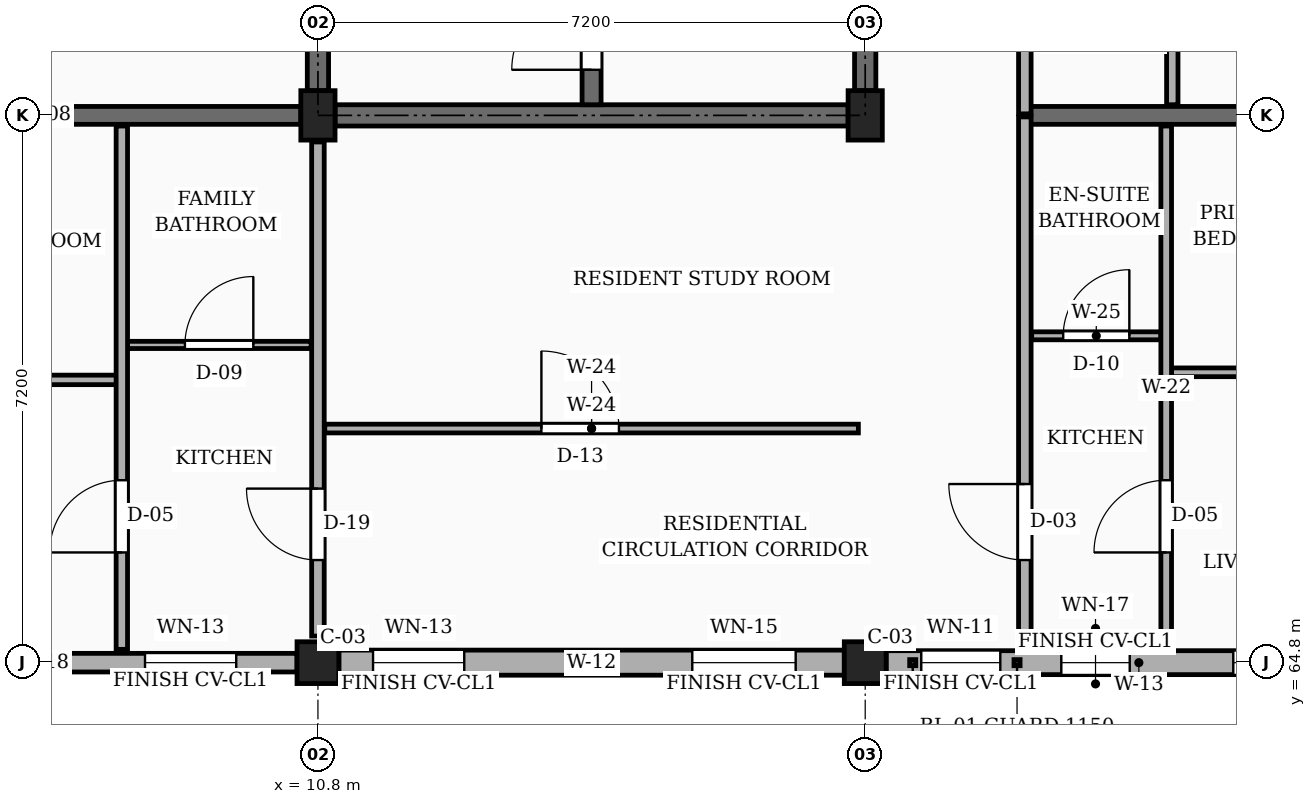
"""IFC4 building model, lengths in metres.
Left out: names, types, materials, properties, quantities, classifications, styles, units other than length and angle.
Written with IfcOpenShell. Run it as: python <this file> out.ifc"""

import sys

from ifc_helpers import new_model, si_unit, direction, frame, frame_2d, origin, origin_2d, place, context, subcontext, project, spatial, rectangle, extrude, element, fill, save


model = new_model("IFC4")
c1 = context("Model", 3, precision=1e-05, world=origin(), true_north=direction((0.0, 1.0)))
c2 = subcontext(c1, "Body", "Model", "MODEL_VIEW")
j1 = project(units=[si_unit("LENGTHUNIT", "METRE"), si_unit("PLANEANGLEUNIT", "RADIAN")], contexts=[c1])
p1 = place(None, origin())
s1 = spatial("IfcSite", under=j1, at=p1, CompositionType="ELEMENT")
p2 = place(p1, origin())
s2 = spatial("IfcBuilding", under=s1, at=p2, CompositionType="ELEMENT")
p3 = place(p2, frame((0.0, 0.0, 20.25)))
s3 = spatial("IfcBuildingStorey", under=s2, at=p3, CompositionType="ELEMENT", Elevation=20.25)
p4 = place(p3, frame((10.8, 64.8, 0.0), z_axis=(0.0, 0.0, 1.0), x_axis=(1.0, 0.0, 0.0)))
e1 = element("IfcColumn", 1, at=p4, inside=s3, PredefinedType="COLUMN", context=c2, shape_type="SweptSolid", body=[
    extrude(rectangle(XDim=0.55, YDim=0.55, at=origin_2d()), origin(), (0.0, 0.0, 1.0), 3.15),
])
p5 = place(p3, frame((10.8, 72.0, 0.0), z_axis=(0.0, 0.0, 1.0), x_axis=(1.0, 0.0, 0.0)))
e2 = element("IfcColumn", 2, at=p5, inside=s3, PredefinedType="COLUMN", context=c2, shape_type="SweptSolid", body=[
    extrude(rectangle(XDim=0.45, YDim=0.65, at=origin_2d()), origin(), (0.0, 0.0, 1.0), 3.15),
])
p6 = place(p3, frame((18.0, 64.8, 0.0), z_axis=(0.0, 0.0, 1.0), x_axis=(1.0, 0.0, 0.0)))
e3 = element("IfcColumn", 3, at=p6, inside=s3, PredefinedType="COLUMN", context=c2, shape_type="SweptSolid", body=[
    extrude(rectangle(XDim=0.55, YDim=0.55, at=origin_2d()), origin(), (0.0, 0.0, 1.0), 3.15),
])
p7 = place(p3, frame((18.0, 72.0, 0.0), z_axis=(0.0, 0.0, 1.0), x_axis=(1.0, 0.0, 0.0)))
e4 = element("IfcColumn", 4, at=p7, inside=s3, PredefinedType="COLUMN", context=c2, shape_type="SweptSolid", body=[
    extrude(rectangle(XDim=0.45, YDim=0.65, at=origin_2d()), origin(), (0.0, 0.0, 1.0), 3.15),
])
p8 = place(p3, frame((3.875, 72.0, 0.0), z_axis=(0.0, 0.0, 1.0), x_axis=(1.0, 0.0, 0.0)))
e5 = element("IfcWall", 5, at=p8, inside=s3, PredefinedType="SOLIDWALL", context=c2, shape_type="SweptSolid", body=[
    extrude(rectangle(XDim=6.7, YDim=0.235, at=frame_2d((3.35, 0.0))), origin(), (0.0, 0.0, 1.0), 2.21),
])
p9 = place(p8, frame((1.35, 0.0, 0.0)))
e6 = element("IfcOpeningElement", 6, at=p9, cuts=e5, PredefinedType="OPENING", context=c2, shape_type="SweptSolid", body=[
    extrude(rectangle(XDim=0.98, YDim=2.12, at=frame_2d((0.49, 1.06))), frame((0.0, 0.127, 0.0), z_axis=(0.0, -1.0, 0.0), x_axis=(1.0, 0.0, 0.0)), (0.0, 0.0, 1.0), 0.255),
])
p10 = place(p3, frame((20.1, 72.0, 0.0), z_axis=(0.0, 0.0, 1.0), x_axis=(1.0, 0.0, 0.0)))
e7 = element("IfcWall", 7, at=p10, inside=s3, PredefinedType="SOLIDWALL", context=c2, shape_type="SweptSolid", body=[
    extrude(rectangle(XDim=4.825, YDim=0.235, at=frame_2d((2.413, 0.0))), origin(), (0.0, 0.0, 1.0), 2.21),
])
p11 = place(p3, frame((3.875, 64.8, 0.0), z_axis=(0.0, 0.0, 1.0), x_axis=(1.0, 0.0, 0.0)))
e8 = element("IfcWall", 8, at=p11, inside=s3, PredefinedType="SOLIDWALL", context=c2, shape_type="SweptSolid", body=[
    extrude(rectangle(XDim=6.65, YDim=0.245, at=frame_2d((3.325, 0.0))), origin(), (0.0, 0.0, 1.0), 2.48),
])
p12 = place(p11, frame((0.45, 0.0, 0.78)))
e9 = element("IfcOpeningElement", 9, at=p12, cuts=e8, PredefinedType="OPENING", context=c2, shape_type="SweptSolid", body=[
    extrude(rectangle(XDim=1.04, YDim=1.26, at=frame_2d((0.52, 0.63))), frame((0.0, 0.133, 0.0), z_axis=(0.0, -1.0, 0.0), x_axis=(1.0, 0.0, 0.0)), (0.0, 0.0, 1.0), 0.265),
])
p13 = place(p11, frame((4.65, 0.0, 0.78)))
e10 = element("IfcOpeningElement", 10, at=p13, cuts=e8, PredefinedType="OPENING", context=c2, shape_type="SweptSolid", body=[
    extrude(rectangle(XDim=1.2, YDim=1.26, at=frame_2d((0.6, 0.63))), frame((0.0, 0.133, 0.0), z_axis=(0.0, -1.0, 0.0), x_axis=(1.0, 0.0, 0.0)), (0.0, 0.0, 1.0), 0.265),
])
p14 = place(p3, frame((11.075, 64.8, 0.0), z_axis=(0.0, 0.0, 1.0), x_axis=(1.0, 0.0, 0.0)))
e11 = element("IfcWall", 11, at=p14, inside=s3, PredefinedType="SOLIDWALL", context=c2, shape_type="SweptSolid", body=[
    extrude(rectangle(XDim=6.65, YDim=0.33, at=frame_2d((3.325, 0.0))), origin(), (0.0, 0.0, 1.0), 2.48),
])
p15 = place(p14, frame((0.45, 0.0, 0.78)))
e12 = element("IfcOpeningElement", 12, at=p15, cuts=e11, PredefinedType="OPENING", context=c2, shape_type="SweptSolid", body=[
    extrude(rectangle(XDim=1.2, YDim=1.26, at=frame_2d((0.6, 0.63))), frame((0.0, 0.175, 0.0), z_axis=(0.0, -1.0, 0.0), x_axis=(1.0, 0.0, 0.0)), (0.0, 0.0, 1.0), 0.35),
])
p16 = place(p14, frame((4.65, 0.0, 0.78)))
e13 = element("IfcOpeningElement", 13, at=p16, cuts=e11, PredefinedType="OPENING", context=c2, shape_type="SweptSolid", body=[
    extrude(rectangle(XDim=1.36, YDim=1.26, at=frame_2d((0.68, 0.63))), frame((0.0, 0.175, 0.0), z_axis=(0.0, -1.0, 0.0), x_axis=(1.0, 0.0, 0.0)), (0.0, 0.0, 1.0), 0.35),
])
p17 = place(p3, frame((18.275, 64.8, 0.0), z_axis=(0.0, 0.0, 1.0), x_axis=(1.0, 0.0, 0.0)))
e14 = element("IfcWall", 14, at=p17, inside=s3, PredefinedType="SOLIDWALL", context=c2, shape_type="SweptSolid", body=[
    extrude(rectangle(XDim=6.65, YDim=0.315, at=frame_2d((3.325, 0.0))), origin(), (0.0, 0.0, 1.0), 2.48),
])
p18 = place(p17, frame((0.462, 0.0, 0.78)))
e15 = element("IfcOpeningElement", 15, at=p18, cuts=e14, PredefinedType="OPENING", context=c2, shape_type="SweptSolid", body=[
    extrude(rectangle(XDim=1.04, YDim=1.26, at=frame_2d((0.52, 0.63))), frame((0.0, 0.167, 0.0), z_axis=(0.0, -1.0, 0.0), x_axis=(1.0, 0.0, 0.0)), (0.0, 0.0, 1.0), 0.335),
])
p19 = place(p17, frame((2.305, 0.0, 0.78)))
e16 = element("IfcOpeningElement", 16, at=p19, cuts=e14, PredefinedType="OPENING", context=c2, shape_type="SweptSolid", body=[
    extrude(rectangle(XDim=0.9, YDim=1.36, at=frame_2d((0.45, 0.68))), frame((0.0, 0.167, 0.0), z_axis=(0.0, -1.0, 0.0), x_axis=(1.0, 0.0, 0.0)), (0.0, 0.0, 1.0), 0.335),
])
p20 = place(p17, frame((4.567, 0.0, 0.78)))
e17 = element("IfcOpeningElement", 17, at=p20, cuts=e14, PredefinedType="OPENING", context=c2, shape_type="SweptSolid", body=[
    extrude(rectangle(XDim=1.06, YDim=1.36, at=frame_2d((0.53, 0.68))), frame((0.0, 0.167, 0.0), z_axis=(0.0, -1.0, 0.0), x_axis=(1.0, 0.0, 0.0)), (0.0, 0.0, 1.0), 0.335),
])
p21 = place(p3, frame((10.8, 72.325, 0.0), z_axis=(0.0, 0.0, 1.0), x_axis=(0.0, 1.0, 0.0)))
e18 = element("IfcWall", 18, at=p21, inside=s3, PredefinedType="SHEAR", context=c2, shape_type="SweptSolid", body=[
    extrude(rectangle(XDim=6.55, YDim=0.28, at=frame_2d((3.275, 0.0))), origin(), (0.0, 0.0, 1.0), 2.91),
])
p22 = place(p3, frame((18.0, 72.325, 0.0), z_axis=(0.0, 0.0, 1.0), x_axis=(0.0, 1.0, 0.0)))
e19 = element("IfcWall", 19, at=p22, inside=s3, PredefinedType="SHEAR", context=c2, shape_type="SweptSolid", body=[
    extrude(rectangle(XDim=6.55, YDim=0.28, at=frame_2d((3.275, 0.0))), origin(), (0.0, 0.0, 1.0), 2.91),
])
p23 = place(p22, frame((1.5, 0.0, 0.0)))
e20 = element("IfcOpeningElement", 20, at=p23, cuts=e19, PredefinedType="OPENING", context=c2, shape_type="SweptSolid", body=[
    extrude(rectangle(XDim=1.1, YDim=2.15, at=frame_2d((0.55, 1.075))), frame((0.0, 0.15, 0.0), z_axis=(0.0, -1.0, 0.0), x_axis=(1.0, 0.0, 0.0)), (0.0, 0.0, 1.0), 0.3),
])
p24 = place(p3, frame((11.025, 72.0, 0.0), z_axis=(0.0, 0.0, 1.0), x_axis=(1.0, 0.0, 0.0)))
e21 = element("IfcWall", 21, at=p24, inside=s3, PredefinedType="SHEAR", context=c2, shape_type="SweptSolid", body=[
    extrude(rectangle(XDim=6.75, YDim=0.28, at=frame_2d((3.375, 0.0))), origin(), (0.0, 0.0, 1.0), 2.91),
])
p25 = place(p3, frame((14.4, 72.14, 0.0), z_axis=(0.0, 0.0, 1.0), x_axis=(0.0, 1.0, 0.0)))
e22 = element("IfcWall", 22, at=p25, inside=s3, PredefinedType="SHEAR", context=c2, shape_type="SweptSolid", body=[
    extrude(rectangle(XDim=6.92, YDim=0.25, at=frame_2d((3.46, 0.0))), origin(), (0.0, 0.0, 1.0), 2.91),
])
p26 = place(p25, frame((0.46, 0.0, 0.0)))
e23 = element("IfcOpeningElement", 23, at=p26, cuts=e22, PredefinedType="OPENING", context=c2, shape_type="SweptSolid", body=[
    extrude(rectangle(XDim=1.05, YDim=2.15, at=frame_2d((0.525, 1.075))), frame((0.0, 0.135, 0.0), z_axis=(0.0, -1.0, 0.0), x_axis=(1.0, 0.0, 0.0)), (0.0, 0.0, 1.0), 0.27),
])
p27 = place(p3, frame((20.1, 64.975, 0.0), z_axis=(0.0, 0.0, 1.0), x_axis=(0.0, 1.0, 0.0)))
e24 = element("IfcWall", 24, at=p27, inside=s3, PredefinedType="PARTITIONING", context=c2, shape_type="SweptSolid", body=[
    extrude(rectangle(XDim=7.005, YDim=0.165, at=frame_2d((3.502, 0.0))), origin(), (0.0, 0.0, 1.0), 2.345),
])
p28 = place(p27, frame((1.175, 0.0, 0.0)))
e25 = element("IfcOpeningElement", 25, at=p28, cuts=e24, PredefinedType="OPENING", context=c2, shape_type="SweptSolid", body=[
    extrude(rectangle(XDim=1.0, YDim=2.15, at=frame_2d((0.5, 1.075))), frame((0.0, 0.093, 0.0), z_axis=(0.0, -1.0, 0.0), x_axis=(1.0, 0.0, 0.0)), (0.0, 0.0, 1.0), 0.185),
])
p29 = place(p3, frame((20.1, 72.02, 0.0), z_axis=(0.0, 0.0, 1.0), x_axis=(0.0, 1.0, 0.0)))
e26 = element("IfcWall", 26, at=p29, inside=s3, PredefinedType="PARTITIONING", context=c2, shape_type="SweptSolid", body=[
    extrude(rectangle(XDim=7.16, YDim=0.165, at=frame_2d((3.58, 0.0))), origin(), (0.0, 0.0, 1.0), 2.345),
])
p30 = place(p29, frame((4.78, 0.0, 0.0)))
e27 = element("IfcOpeningElement", 27, at=p30, cuts=e26, PredefinedType="OPENING", context=c2, shape_type="SweptSolid", body=[
    extrude(rectangle(XDim=0.94, YDim=2.12, at=frame_2d((0.47, 1.06))), frame((0.0, 0.093, 0.0), z_axis=(0.0, -1.0, 0.0), x_axis=(1.0, 0.0, 0.0)), (0.0, 0.0, 1.0), 0.185),
])
p31 = place(p3, frame((10.8, 65.15, 0.0), z_axis=(0.0, 0.0, 1.0), x_axis=(0.0, 1.0, 0.0)))
e28 = element("IfcWall", 28, at=p31, inside=s3, PredefinedType="PARTITIONING", context=c2, shape_type="SweptSolid", body=[
    extrude(rectangle(XDim=6.5, YDim=0.165, at=frame_2d((3.25, 0.0))), origin(), (0.0, 0.0, 1.0), 2.345),
])
p32 = place(p31, frame((1.0, 0.0, 0.0)))
e29 = element("IfcOpeningElement", 29, at=p32, cuts=e28, PredefinedType="OPENING", context=c2, shape_type="SweptSolid", body=[
    extrude(rectangle(XDim=0.94, YDim=2.12, at=frame_2d((0.47, 1.06))), frame((0.0, 0.093, 0.0), z_axis=(0.0, -1.0, 0.0), x_axis=(1.0, 0.0, 0.0)), (0.0, 0.0, 1.0), 0.185),
])
p33 = place(p3, frame((10.89, 67.88, 0.0), z_axis=(0.0, 0.0, 1.0), x_axis=(1.0, 0.0, 0.0)))
e30 = element("IfcWall", 30, at=p33, inside=s3, PredefinedType="PARTITIONING", context=c2, shape_type="SweptSolid", body=[
    extrude(rectangle(XDim=7.02, YDim=0.115, at=frame_2d((3.51, 0.0))), origin(), (0.0, 0.0, 1.0), 2.345),
])
p34 = place(p33, frame((2.85, 0.0, 0.0)))
e31 = element("IfcOpeningElement", 31, at=p34, cuts=e30, PredefinedType="OPENING", context=c2, shape_type="SweptSolid", body=[
    extrude(rectangle(XDim=1.02, YDim=2.15, at=frame_2d((0.51, 1.075))), frame((0.0, 0.067, 0.0), z_axis=(0.0, -1.0, 0.0), x_axis=(1.0, 0.0, 0.0)), (0.0, 0.0, 1.0), 0.135),
])
p35 = place(p3, frame((3.775, 68.52, 0.0), z_axis=(0.0, 0.0, 1.0), x_axis=(1.0, 0.0, 0.0)))
e32 = element("IfcWall", 32, at=p35, inside=s3, PredefinedType="PARTITIONING", context=c2, shape_type="SweptSolid", body=[
    extrude(rectangle(XDim=4.375, YDim=0.125, at=frame_2d((2.188, 0.0))), origin(), (0.0, 0.0, 1.0), 2.345),
])
p36 = place(p35, frame((1.738, 0.0, 0.0)))
e33 = element("IfcOpeningElement", 33, at=p36, cuts=e32, PredefinedType="OPENING", context=c2, shape_type="SweptSolid", body=[
    extrude(rectangle(XDim=0.9, YDim=2.1, at=frame_2d((0.45, 1.05))), frame((0.0, 0.073, 0.0), z_axis=(0.0, -1.0, 0.0), x_axis=(1.0, 0.0, 0.0)), (0.0, 0.0, 1.0), 0.145),
])
p37 = place(p3, frame((8.29, 68.98, 0.0), z_axis=(0.0, 0.0, 1.0), x_axis=(1.0, 0.0, 0.0)))
e34 = element("IfcWall", 34, at=p37, inside=s3, PredefinedType="PARTITIONING", context=c2, shape_type="SweptSolid", body=[
    extrude(rectangle(XDim=2.42, YDim=0.095, at=frame_2d((1.21, 0.0))), origin(), (0.0, 0.0, 1.0), 2.345),
])
p38 = place(p37, frame((0.76, 0.0, 0.0)))
e35 = element("IfcOpeningElement", 35, at=p38, cuts=e34, PredefinedType="OPENING", context=c2, shape_type="SweptSolid", body=[
    extrude(rectangle(XDim=0.9, YDim=2.05, at=frame_2d((0.45, 1.025))), frame((0.0, 0.058, 0.0), z_axis=(0.0, -1.0, 0.0), x_axis=(1.0, 0.0, 0.0)), (0.0, 0.0, 1.0), 0.115),
])
p39 = place(p3, frame((8.22, 64.975, 0.0), z_axis=(0.0, 0.0, 1.0), x_axis=(0.0, 1.0, 0.0)))
e36 = element("IfcWall", 36, at=p39, inside=s3, PredefinedType="PARTITIONING", context=c2, shape_type="SweptSolid", body=[
    extrude(rectangle(XDim=6.885, YDim=0.15, at=frame_2d((3.442, 0.0))), origin(), (0.0, 0.0, 1.0), 2.345),
])
p40 = place(p39, frame((1.275, 0.0, 0.0)))
e37 = element("IfcOpeningElement", 37, at=p40, cuts=e36, PredefinedType="OPENING", context=c2, shape_type="SweptSolid", body=[
    extrude(rectangle(XDim=0.95, YDim=2.1, at=frame_2d((0.475, 1.05))), frame((0.0, 0.085, 0.0), z_axis=(0.0, -1.0, 0.0), x_axis=(1.0, 0.0, 0.0)), (0.0, 0.0, 1.0), 0.17),
])
p41 = place(p3, frame((22.03, 68.62, 0.0), z_axis=(0.0, 0.0, 1.0), x_axis=(1.0, 0.0, 0.0)))
e38 = element("IfcWall", 38, at=p41, inside=s3, PredefinedType="PARTITIONING", context=c2, shape_type="SweptSolid", body=[
    extrude(rectangle(XDim=2.995, YDim=0.115, at=frame_2d((1.498, 0.0))), origin(), (0.0, 0.0, 1.0), 2.345),
])
p42 = place(p41, frame((1.048, 0.0, 0.0)))
e39 = element("IfcOpeningElement", 39, at=p42, cuts=e38, PredefinedType="OPENING", context=c2, shape_type="SweptSolid", body=[
    extrude(rectangle(XDim=0.9, YDim=2.1, at=frame_2d((0.45, 1.05))), frame((0.0, 0.067, 0.0), z_axis=(0.0, -1.0, 0.0), x_axis=(1.0, 0.0, 0.0)), (0.0, 0.0, 1.0), 0.135),
])
p43 = place(p3, frame((20.19, 69.1, 0.0), z_axis=(0.0, 0.0, 1.0), x_axis=(1.0, 0.0, 0.0)))
e40 = element("IfcWall", 40, at=p43, inside=s3, PredefinedType="PARTITIONING", context=c2, shape_type="SweptSolid", body=[
    extrude(rectangle(XDim=1.7, YDim=0.105, at=frame_2d((0.85, 0.0))), origin(), (0.0, 0.0, 1.0), 2.345),
])
p44 = place(p43, frame((0.415, 0.0, 0.0)))
e41 = element("IfcOpeningElement", 41, at=p44, cuts=e40, PredefinedType="OPENING", context=c2, shape_type="SweptSolid", body=[
    extrude(rectangle(XDim=0.87, YDim=2.05, at=frame_2d((0.435, 1.025))), frame((0.0, 0.062, 0.0), z_axis=(0.0, -1.0, 0.0), x_axis=(1.0, 0.0, 0.0)), (0.0, 0.0, 1.0), 0.125),
])
p45 = place(p3, frame((21.96, 64.975, 0.0), z_axis=(0.0, 0.0, 1.0), x_axis=(0.0, 1.0, 0.0)))
e42 = element("IfcWall", 42, at=p45, inside=s3, PredefinedType="PARTITIONING", context=c2, shape_type="SweptSolid", body=[
    extrude(rectangle(XDim=6.885, YDim=0.14, at=frame_2d((3.442, 0.0))), origin(), (0.0, 0.0, 1.0), 2.345),
])
p46 = place(p45, frame((1.275, 0.0, 0.0)))
e43 = element("IfcOpeningElement", 43, at=p46, cuts=e42, PredefinedType="OPENING", context=c2, shape_type="SweptSolid", body=[
    extrude(rectangle(XDim=0.95, YDim=2.1, at=frame_2d((0.475, 1.05))), frame((0.0, 0.08, 0.0), z_axis=(0.0, -1.0, 0.0), x_axis=(1.0, 0.0, 0.0)), (0.0, 0.0, 1.0), 0.16),
])
p47 = place(p3, frame((22.04, 72.14, 0.0), z_axis=(0.0, 0.0, 1.0), x_axis=(0.0, 1.0, 0.0)))
e44 = element("IfcWall", 44, at=p47, inside=s3, PredefinedType="PARTITIONING", context=c2, shape_type="SweptSolid", body=[
    extrude(rectangle(XDim=6.92, YDim=0.15, at=frame_2d((3.46, 0.0))), origin(), (0.0, 0.0, 1.0), 2.345),
])
p48 = place(p47, frame((4.66, 0.0, 0.0)))
e45 = element("IfcOpeningElement", 45, at=p48, cuts=e44, PredefinedType="OPENING", context=c2, shape_type="SweptSolid", body=[
    extrude(rectangle(XDim=0.92, YDim=2.1, at=frame_2d((0.46, 1.05))), frame((0.0, 0.085, 0.0), z_axis=(0.0, -1.0, 0.0), x_axis=(1.0, 0.0, 0.0)), (0.0, 0.0, 1.0), 0.17),
])
p49 = place(p13, origin())
e46 = element("IfcWindow", 46, at=p49, inside=s3, PartitioningType="SINGLE_PANEL", PredefinedType="WINDOW", context=c2, shape_type="SweptSolid", body=[
    extrude(rectangle(XDim=1.2, YDim=1.26, at=frame_2d((0.6, 0.63))), frame((0.0, 0.03, 0.0), z_axis=(0.0, -1.0, 0.0), x_axis=(1.0, 0.0, 0.0)), (0.0, 0.0, 1.0), 0.06),
])
fill(e10, e46)
p50 = place(p15, origin())
e47 = element("IfcWindow", 47, at=p50, inside=s3, PartitioningType="SINGLE_PANEL", PredefinedType="WINDOW", context=c2, shape_type="SweptSolid", body=[
    extrude(rectangle(XDim=1.2, YDim=1.26, at=frame_2d((0.6, 0.63))), frame((0.0, 0.03, 0.0), z_axis=(0.0, -1.0, 0.0), x_axis=(1.0, 0.0, 0.0)), (0.0, 0.0, 1.0), 0.06),
])
fill(e12, e47)
p51 = place(p16, origin())
e48 = element("IfcWindow", 48, at=p51, inside=s3, PartitioningType="SINGLE_PANEL", PredefinedType="WINDOW", context=c2, shape_type="SweptSolid", body=[
    extrude(rectangle(XDim=1.36, YDim=1.26, at=frame_2d((0.68, 0.63))), frame((0.0, 0.03, 0.0), z_axis=(0.0, -1.0, 0.0), x_axis=(1.0, 0.0, 0.0)), (0.0, 0.0, 1.0), 0.06),
])
fill(e13, e48)
p52 = place(p18, origin())
e49 = element("IfcWindow", 49, at=p52, inside=s3, PartitioningType="SINGLE_PANEL", PredefinedType="WINDOW", context=c2, shape_type="SweptSolid", body=[
    extrude(rectangle(XDim=1.04, YDim=1.26, at=frame_2d((0.52, 0.63))), frame((0.0, 0.03, 0.0), z_axis=(0.0, -1.0, 0.0), x_axis=(1.0, 0.0, 0.0)), (0.0, 0.0, 1.0), 0.06),
])
fill(e15, e49)
p53 = place(p19, origin())
e50 = element("IfcWindow", 50, at=p53, inside=s3, PartitioningType="SINGLE_PANEL", PredefinedType="WINDOW", context=c2, shape_type="SweptSolid", body=[
    extrude(rectangle(XDim=0.9, YDim=1.36, at=frame_2d((0.45, 0.68))), frame((0.0, 0.03, 0.0), z_axis=(0.0, -1.0, 0.0), x_axis=(1.0, 0.0, 0.0)), (0.0, 0.0, 1.0), 0.06),
])
fill(e16, e50)
p54 = place(p20, origin())
e51 = element("IfcWindow", 51, at=p54, inside=s3, PartitioningType="SINGLE_PANEL", PredefinedType="WINDOW", context=c2, shape_type="SweptSolid", body=[
    extrude(rectangle(XDim=1.06, YDim=1.36, at=frame_2d((0.53, 0.68))), frame((0.0, 0.03, 0.0), z_axis=(0.0, -1.0, 0.0), x_axis=(1.0, 0.0, 0.0)), (0.0, 0.0, 1.0), 0.06),
])
fill(e17, e51)
p55 = place(p26, origin())
e52 = element("IfcDoor", 52, at=p55, inside=s3, OperationType="SINGLE_SWING_LEFT", PredefinedType="DOOR", context=c2, shape_type="SweptSolid", body=[
    extrude(rectangle(XDim=1.05, YDim=2.15, at=frame_2d((0.525, 1.075))), frame((0.0, 0.025, 0.0), z_axis=(0.0, -1.0, 0.0), x_axis=(1.0, 0.0, 0.0)), (0.0, 0.0, 1.0), 0.05),
])
fill(e23, e52)
p56 = place(p28, origin())
e53 = element("IfcDoor", 53, at=p56, inside=s3, OperationType="SINGLE_SWING_RIGHT", PredefinedType="DOOR", context=c2, shape_type="SweptSolid", body=[
    extrude(rectangle(XDim=1.0, YDim=2.15, at=frame_2d((0.5, 1.075))), frame((0.0, 0.025, 0.0), z_axis=(0.0, -1.0, 0.0), x_axis=(1.0, 0.0, 0.0)), (0.0, 0.0, 1.0), 0.05),
])
fill(e25, e53)
p57 = place(p32, origin())
e54 = element("IfcDoor", 54, at=p57, inside=s3, OperationType="SINGLE_SWING_RIGHT", PredefinedType="DOOR", context=c2, shape_type="SweptSolid", body=[
    extrude(rectangle(XDim=0.94, YDim=2.12, at=frame_2d((0.47, 1.06))), frame((0.0, 0.025, 0.0), z_axis=(0.0, -1.0, 0.0), x_axis=(1.0, 0.0, 0.0)), (0.0, 0.0, 1.0), 0.05),
])
fill(e29, e54)
p58 = place(p34, origin())
e55 = element("IfcDoor", 55, at=p58, inside=s3, OperationType="SINGLE_SWING_LEFT", PredefinedType="DOOR", context=c2, shape_type="SweptSolid", body=[
    extrude(rectangle(XDim=1.02, YDim=2.15, at=frame_2d((0.51, 1.075))), frame((0.0, 0.025, 0.0), z_axis=(0.0, -1.0, 0.0), x_axis=(1.0, 0.0, 0.0)), (0.0, 0.0, 1.0), 0.05),
])
fill(e31, e55)
p59 = place(p38, origin())
e56 = element("IfcDoor", 56, at=p59, inside=s3, OperationType="SINGLE_SWING_RIGHT", PredefinedType="DOOR", context=c2, shape_type="SweptSolid", body=[
    extrude(rectangle(XDim=0.9, YDim=2.05, at=frame_2d((0.45, 1.025))), frame((0.0, 0.025, 0.0), z_axis=(0.0, -1.0, 0.0), x_axis=(1.0, 0.0, 0.0)), (0.0, 0.0, 1.0), 0.05),
])
fill(e35, e56)
p60 = place(p40, origin())
e57 = element("IfcDoor", 57, at=p60, inside=s3, OperationType="SINGLE_SWING_LEFT", PredefinedType="DOOR", context=c2, shape_type="SweptSolid", body=[
    extrude(rectangle(XDim=0.95, YDim=2.1, at=frame_2d((0.475, 1.05))), frame((0.0, 0.025, 0.0), z_axis=(0.0, -1.0, 0.0), x_axis=(1.0, 0.0, 0.0)), (0.0, 0.0, 1.0), 0.05),
])
fill(e37, e57)
p61 = place(p44, origin())
e58 = element("IfcDoor", 58, at=p61, inside=s3, OperationType="SINGLE_SWING_RIGHT", PredefinedType="DOOR", context=c2, shape_type="SweptSolid", body=[
    extrude(rectangle(XDim=0.87, YDim=2.05, at=frame_2d((0.435, 1.025))), frame((0.0, 0.025, 0.0), z_axis=(0.0, -1.0, 0.0), x_axis=(1.0, 0.0, 0.0)), (0.0, 0.0, 1.0), 0.05),
])
fill(e41, e58)
p62 = place(p46, origin())
e59 = element("IfcDoor", 59, at=p62, inside=s3, OperationType="SINGLE_SWING_LEFT", PredefinedType="DOOR", context=c2, shape_type="SweptSolid", body=[
    extrude(rectangle(XDim=0.95, YDim=2.1, at=frame_2d((0.475, 1.05))), frame((0.0, 0.025, 0.0), z_axis=(0.0, -1.0, 0.0), x_axis=(1.0, 0.0, 0.0)), (0.0, 0.0, 1.0), 0.05),
])
fill(e43, e59)
save(model, sys.argv[1])
